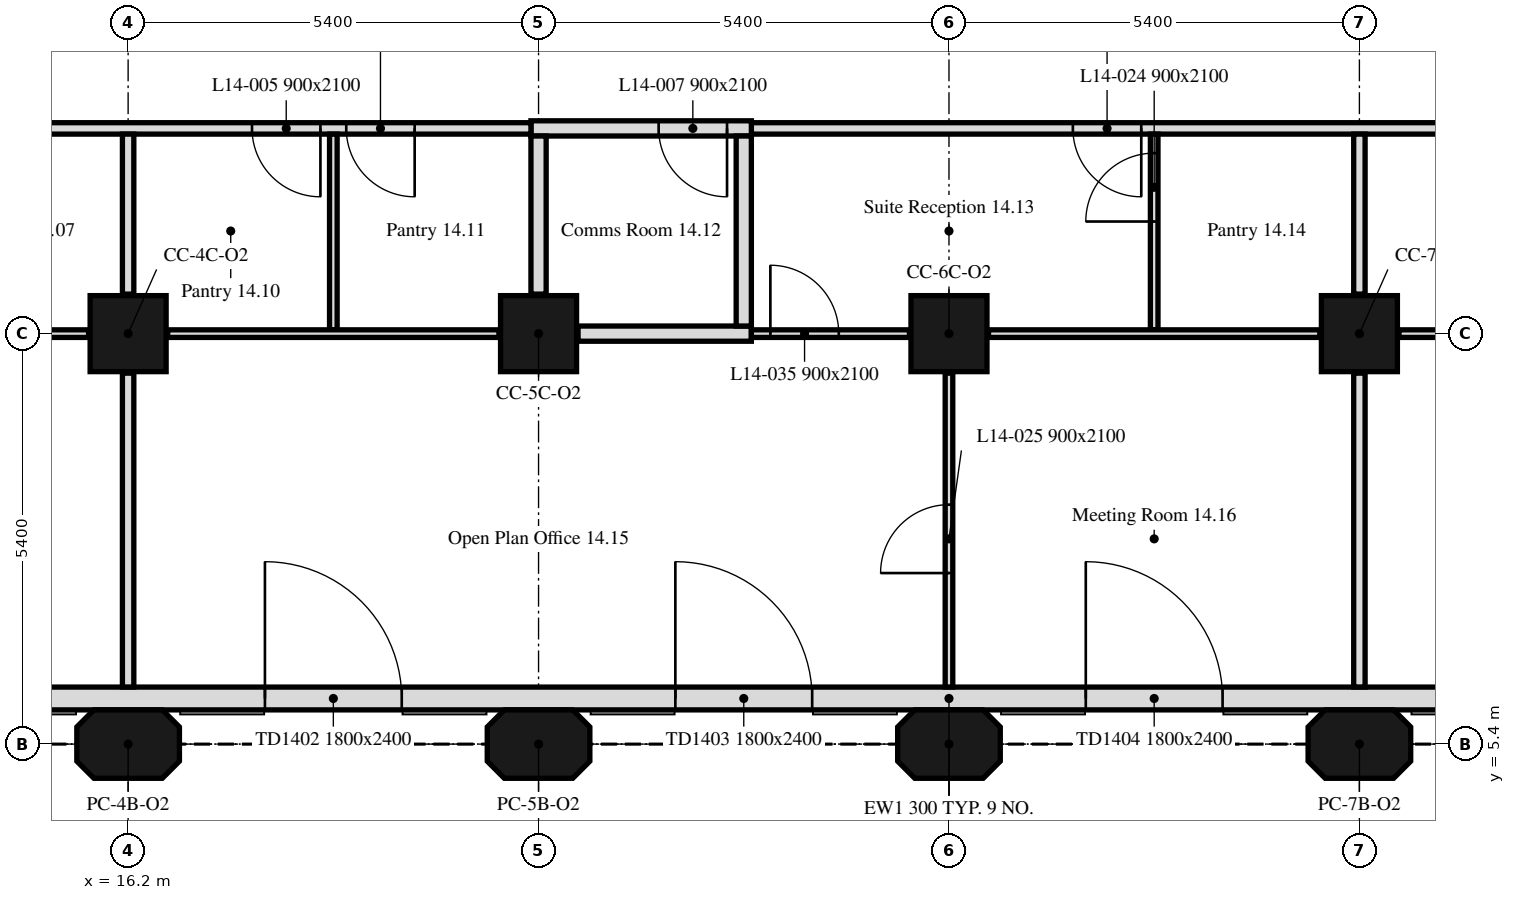
"""IFC4 building model, lengths in metres.
Left out: names, types, materials, properties, quantities, classifications, styles, units other than length and angle.
Written with IfcOpenShell. Run it as: python <this file> out.ifc"""

import sys

from ifc_helpers import new_model, si_unit, direction, frame, frame_2d, origin, origin_2d, place, context, subcontext, project, spatial, polyline, rectangle, outline, extrude, element, fill, save


model = new_model("IFC4")
c1 = context("Model", 3, precision=1e-05, world=origin(), true_north=direction((0.0, 1.0)))
c2 = subcontext(c1, "Body", "Model", "MODEL_VIEW")
j1 = project(units=[si_unit("LENGTHUNIT", "METRE"), si_unit("PLANEANGLEUNIT", "RADIAN")], contexts=[c1])
p1 = place(None, origin())
s1 = spatial("IfcSite", under=j1, at=p1, CompositionType="ELEMENT")
p2 = place(p1, origin())
s2 = spatial("IfcBuilding", under=s1, at=p2, CompositionType="ELEMENT")
p3 = place(p2, frame((0.0, 0.0, 65.0)))
s3 = spatial("IfcBuildingStorey", under=s2, at=p3, CompositionType="ELEMENT", Elevation=65.0)
for number, where, z_axis, x_axis in (
    (1, (16.2, 5.4, 0.0), (0.0, 0.0, 1.0), (1.0, 0.0, 0.0)),
    (2, (21.6, 5.4, 0.0), (0.0, 0.0, 1.0), (1.0, 0.0, 0.0)),
    (3, (27.0, 5.4, 0.0), (0.0, 0.0, 1.0), (1.0, 0.0, 0.0)),
    (4, (32.4, 5.4, 0.0), (0.0, 0.0, 1.0), (1.0, 0.0, 0.0)),
):
    element("IfcColumn", number, at=place(p3, frame(where, z_axis=z_axis, x_axis=x_axis)), inside=s3, PredefinedType="COLUMN", context=c2, shape_type="SweptSolid", body=[
        extrude(outline(polyline([(-0.45, -0.45), (0.45, -0.45), (0.675, -0.225), (0.675, 0.225), (0.45, 0.45), (-0.45, 0.45), (-0.675, 0.225), (-0.675, -0.225), (-0.45, -0.45)])), origin(), (0.0, 0.0, 1.0), 3.5),
    ])
for number, where, z_axis, x_axis in (
    (5, (16.2, 10.8, 0.0), (0.0, 0.0, 1.0), (1.0, 0.0, 0.0)),
    (6, (21.6, 10.8, 0.0), (0.0, 0.0, 1.0), (1.0, 0.0, 0.0)),
    (7, (27.0, 10.8, 0.0), (0.0, 0.0, 1.0), (1.0, 0.0, 0.0)),
    (8, (32.4, 10.8, 0.0), (0.0, 0.0, 1.0), (1.0, 0.0, 0.0)),
):
    element("IfcColumn", number, at=place(p3, frame(where, z_axis=z_axis, x_axis=x_axis)), inside=s3, PredefinedType="COLUMN", context=c2, shape_type="SweptSolid", body=[
        extrude(rectangle(XDim=1.0, YDim=1.0, at=origin_2d()), origin(), (0.0, 0.0, 1.0), 3.5),
    ])
p4 = place(p3, frame((10.986, 6.0, 0.0), z_axis=(0.0, 0.0, 1.0), x_axis=(1.0, 0.0, 0.0)))
e9 = element("IfcWall", 9, at=p4, inside=s3, PredefinedType="SOLIDWALL", context=c2, shape_type="SweptSolid", body=[
    extrude(rectangle(XDim=32.027, YDim=0.3, at=frame_2d((16.014, 0.0))), origin(), (0.0, 0.0, 1.0), 3.5),
])
p5 = place(p4, frame((1.614, 0.0, 0.0)))
e10 = element("IfcOpeningElement", 10, at=p5, cuts=e9, PredefinedType="OPENING", context=c2, shape_type="SweptSolid", body=[
    extrude(rectangle(XDim=1.8, YDim=2.4, at=frame_2d((0.9, 1.2))), frame((0.0, 0.16, 0.0), z_axis=(0.0, -1.0, 0.0), x_axis=(1.0, 0.0, 0.0)), (0.0, 0.0, 1.0), 0.32),
])
p6 = place(p4, frame((7.014, 0.0, 0.0)))
e11 = element("IfcOpeningElement", 11, at=p6, cuts=e9, PredefinedType="OPENING", context=c2, shape_type="SweptSolid", body=[
    extrude(rectangle(XDim=1.8, YDim=2.4, at=frame_2d((0.9, 1.2))), frame((0.0, 0.16, 0.0), z_axis=(0.0, -1.0, 0.0), x_axis=(1.0, 0.0, 0.0)), (0.0, 0.0, 1.0), 0.32),
])
p7 = place(p4, frame((12.414, 0.0, 0.0)))
e12 = element("IfcOpeningElement", 12, at=p7, cuts=e9, PredefinedType="OPENING", context=c2, shape_type="SweptSolid", body=[
    extrude(rectangle(XDim=1.8, YDim=2.4, at=frame_2d((0.9, 1.2))), frame((0.0, 0.16, 0.0), z_axis=(0.0, -1.0, 0.0), x_axis=(1.0, 0.0, 0.0)), (0.0, 0.0, 1.0), 0.32),
])
p8 = place(p4, frame((17.814, 0.0, 0.0)))
e13 = element("IfcOpeningElement", 13, at=p8, cuts=e9, PredefinedType="OPENING", context=c2, shape_type="SweptSolid", body=[
    extrude(rectangle(XDim=1.8, YDim=2.4, at=frame_2d((0.9, 1.2))), frame((0.0, 0.16, 0.0), z_axis=(0.0, -1.0, 0.0), x_axis=(1.0, 0.0, 0.0)), (0.0, 0.0, 1.0), 0.32),
])
p9 = place(p4, frame((23.214, 0.0, 0.0)))
e14 = element("IfcOpeningElement", 14, at=p9, cuts=e9, PredefinedType="OPENING", context=c2, shape_type="SweptSolid", body=[
    extrude(rectangle(XDim=1.8, YDim=2.4, at=frame_2d((0.9, 1.2))), frame((0.0, 0.16, 0.0), z_axis=(0.0, -1.0, 0.0), x_axis=(1.0, 0.0, 0.0)), (0.0, 0.0, 1.0), 0.32),
])
p10 = place(p4, frame((28.614, 0.0, 0.0)))
e15 = element("IfcOpeningElement", 15, at=p10, cuts=e9, PredefinedType="OPENING", context=c2, shape_type="SweptSolid", body=[
    extrude(rectangle(XDim=1.8, YDim=2.4, at=frame_2d((0.9, 1.2))), frame((0.0, 0.16, 0.0), z_axis=(0.0, -1.0, 0.0), x_axis=(1.0, 0.0, 0.0)), (0.0, 0.0, 1.0), 0.32),
])
p11 = place(p3, frame((37.7, 13.5, 0.0), z_axis=(0.0, 0.0, 1.0), x_axis=(-1.0, 0.0, 0.0)))
e16 = element("IfcWall", 16, at=p11, inside=s3, PredefinedType="PARTITIONING", context=c2, shape_type="SweptSolid", body=[
    extrude(rectangle(XDim=13.3, YDim=0.15, at=frame_2d((6.65, 0.0))), origin(), (0.0, 0.0, 1.0), 3.5),
])
p12 = place(p11, frame((2.15, 0.0, 0.0)))
e17 = element("IfcOpeningElement", 17, at=p12, cuts=e16, PredefinedType="OPENING", context=c2, shape_type="SweptSolid", body=[
    extrude(rectangle(XDim=0.9, YDim=2.1, at=frame_2d((0.45, 1.05))), frame((0.0, 0.075, 0.0), z_axis=(0.0, -1.0, 0.0), x_axis=(1.0, 0.0, 0.0)), (0.0, 0.0, 1.0), 0.15),
])
p13 = place(p11, frame((8.17, 0.0, 0.0)))
e18 = element("IfcOpeningElement", 18, at=p13, cuts=e16, PredefinedType="OPENING", context=c2, shape_type="SweptSolid", body=[
    extrude(rectangle(XDim=0.9, YDim=2.1, at=frame_2d((0.45, 1.05))), frame((0.0, 0.075, 0.0), z_axis=(0.0, -1.0, 0.0), x_axis=(1.0, 0.0, 0.0)), (0.0, 0.0, 1.0), 0.15),
])
p14 = place(p3, frame((24.4, 13.5, 0.0), z_axis=(0.0, 0.0, 1.0), x_axis=(-1.0, 0.0, 0.0)))
e19 = element("IfcWall", 19, at=p14, inside=s3, PredefinedType="PARTITIONING", context=c2, shape_type="SweptSolid", body=[
    extrude(rectangle(XDim=2.9, YDim=0.2, at=frame_2d((1.45, 0.0))), origin(), (0.0, 0.0, 1.0), 3.5),
])
p15 = place(p14, frame((0.32, 0.0, 0.0)))
e20 = element("IfcOpeningElement", 20, at=p15, cuts=e19, PredefinedType="OPENING", context=c2, shape_type="SweptSolid", body=[
    extrude(rectangle(XDim=0.9, YDim=2.1, at=frame_2d((0.45, 1.05))), frame((0.0, 0.1, 0.0), z_axis=(0.0, -1.0, 0.0), x_axis=(1.0, 0.0, 0.0)), (0.0, 0.0, 1.0), 0.2),
])
p16 = place(p3, frame((21.5, 13.5, 0.0), z_axis=(0.0, 0.0, 1.0), x_axis=(-1.0, 0.0, 0.0)))
e21 = element("IfcWall", 21, at=p16, inside=s3, PredefinedType="PARTITIONING", context=c2, shape_type="SweptSolid", body=[
    extrude(rectangle(XDim=15.349, YDim=0.15, at=frame_2d((7.675, 0.0))), origin(), (0.0, 0.0, 1.0), 3.5),
])
p17 = place(p16, frame((13.57, 0.0, 0.0)))
e22 = element("IfcOpeningElement", 22, at=p17, cuts=e21, PredefinedType="OPENING", context=c2, shape_type="SweptSolid", body=[
    extrude(rectangle(XDim=0.9, YDim=2.1, at=frame_2d((0.45, 1.05))), frame((0.0, 0.075, 0.0), z_axis=(0.0, -1.0, 0.0), x_axis=(1.0, 0.0, 0.0)), (0.0, 0.0, 1.0), 0.15),
])
p18 = place(p16, frame((2.77, 0.0, 0.0)))
e23 = element("IfcOpeningElement", 23, at=p18, cuts=e21, PredefinedType="OPENING", context=c2, shape_type="SweptSolid", body=[
    extrude(rectangle(XDim=0.9, YDim=2.1, at=frame_2d((0.45, 1.05))), frame((0.0, 0.075, 0.0), z_axis=(0.0, -1.0, 0.0), x_axis=(1.0, 0.0, 0.0)), (0.0, 0.0, 1.0), 0.15),
])
p19 = place(p16, frame((1.53, 0.0, 0.0)))
e24 = element("IfcOpeningElement", 24, at=p19, cuts=e21, PredefinedType="OPENING", context=c2, shape_type="SweptSolid", body=[
    extrude(rectangle(XDim=0.9, YDim=2.1, at=frame_2d((0.45, 1.05))), frame((0.0, 0.075, 0.0), z_axis=(0.0, -1.0, 0.0), x_axis=(1.0, 0.0, 0.0)), (0.0, 0.0, 1.0), 0.15),
])
p20 = place(p16, frame((8.17, 0.0, 0.0)))
e25 = element("IfcOpeningElement", 25, at=p20, cuts=e21, PredefinedType="OPENING", context=c2, shape_type="SweptSolid", body=[
    extrude(rectangle(XDim=0.9, YDim=2.1, at=frame_2d((0.45, 1.05))), frame((0.0, 0.075, 0.0), z_axis=(0.0, -1.0, 0.0), x_axis=(1.0, 0.0, 0.0)), (0.0, 0.0, 1.0), 0.15),
])
p21 = place(p3, frame((11.32, 10.8, 0.0), z_axis=(0.0, 0.0, 1.0), x_axis=(1.0, 0.0, 0.0)))
e26 = element("IfcWall", 26, at=p21, inside=s3, PredefinedType="PARTITIONING", context=c2, shape_type="SweptSolid", body=[
    extrude(rectangle(XDim=4.36, YDim=0.1, at=frame_2d((2.18, 0.0))), origin(), (0.0, 0.0, 1.0), 3.5),
])
p22 = place(p3, frame((16.2, 11.32, 0.0), z_axis=(0.0, 0.0, 1.0), x_axis=(0.0, 1.0, 0.0)))
e27 = element("IfcWall", 27, at=p22, inside=s3, PredefinedType="PARTITIONING", context=c2, shape_type="SweptSolid", body=[
    extrude(rectangle(XDim=2.105, YDim=0.15, at=frame_2d((1.052, 0.0))), origin(), (0.0, 0.0, 1.0), 3.5),
])
p23 = place(p3, frame((16.2, 6.151, 0.0), z_axis=(0.0, 0.0, 1.0), x_axis=(0.0, 1.0, 0.0)))
e28 = element("IfcWall", 28, at=p23, inside=s3, PredefinedType="PARTITIONING", context=c2, shape_type="SweptSolid", body=[
    extrude(rectangle(XDim=4.129, YDim=0.15, at=frame_2d((2.064, 0.0))), origin(), (0.0, 0.0, 1.0), 3.5),
])
p24 = place(p3, frame((18.9, 10.85, 0.0), z_axis=(0.0, 0.0, 1.0), x_axis=(0.0, 1.0, 0.0)))
e29 = element("IfcWall", 29, at=p24, inside=s3, PredefinedType="PARTITIONING", context=c2, shape_type="SweptSolid", body=[
    extrude(rectangle(XDim=2.575, YDim=0.1, at=frame_2d((1.288, 0.0))), origin(), (0.0, 0.0, 1.0), 3.5),
])
p25 = place(p3, frame((16.72, 10.8, 0.0), z_axis=(0.0, 0.0, 1.0), x_axis=(1.0, 0.0, 0.0)))
e30 = element("IfcWall", 30, at=p25, inside=s3, PredefinedType="PARTITIONING", context=c2, shape_type="SweptSolid", body=[
    extrude(rectangle(XDim=4.36, YDim=0.1, at=frame_2d((2.18, 0.0))), origin(), (0.0, 0.0, 1.0), 3.5),
])
p26 = place(p3, frame((21.6, 11.32, 0.0), z_axis=(0.0, 0.0, 1.0), x_axis=(0.0, 1.0, 0.0)))
e31 = element("IfcWall", 31, at=p26, inside=s3, PredefinedType="PARTITIONING", context=c2, shape_type="SweptSolid", body=[
    extrude(rectangle(XDim=2.08, YDim=0.2, at=frame_2d((1.04, 0.0))), origin(), (0.0, 0.0, 1.0), 3.5),
])
p27 = place(p3, frame((22.12, 10.8, 0.0), z_axis=(0.0, 0.0, 1.0), x_axis=(1.0, 0.0, 0.0)))
e32 = element("IfcWall", 32, at=p27, inside=s3, PredefinedType="PARTITIONING", context=c2, shape_type="SweptSolid", body=[
    extrude(rectangle(XDim=2.28, YDim=0.2, at=frame_2d((1.14, 0.0))), origin(), (0.0, 0.0, 1.0), 3.5),
])
p28 = place(p3, frame((24.3, 10.9, 0.0), z_axis=(0.0, 0.0, 1.0), x_axis=(0.0, 1.0, 0.0)))
e33 = element("IfcWall", 33, at=p28, inside=s3, PredefinedType="PARTITIONING", context=c2, shape_type="SweptSolid", body=[
    extrude(rectangle(XDim=2.5, YDim=0.2, at=frame_2d((1.25, 0.0))), origin(), (0.0, 0.0, 1.0), 3.5),
])
p29 = place(p3, frame((24.4, 10.8, 0.0), z_axis=(0.0, 0.0, 1.0), x_axis=(1.0, 0.0, 0.0)))
e34 = element("IfcWall", 34, at=p29, inside=s3, PredefinedType="PARTITIONING", context=c2, shape_type="SweptSolid", body=[
    extrude(rectangle(XDim=2.08, YDim=0.1, at=frame_2d((1.04, 0.0))), origin(), (0.0, 0.0, 1.0), 3.5),
])
p30 = place(p29, frame((0.25, 0.0, 0.0)))
e35 = element("IfcOpeningElement", 35, at=p30, cuts=e34, PredefinedType="OPENING", context=c2, shape_type="SweptSolid", body=[
    extrude(rectangle(XDim=0.9, YDim=2.1, at=frame_2d((0.45, 1.05))), frame((0.0, 0.05, 0.0), z_axis=(0.0, -1.0, 0.0), x_axis=(1.0, 0.0, 0.0)), (0.0, 0.0, 1.0), 0.1),
])
p31 = place(p3, frame((29.7, 10.85, 0.0), z_axis=(0.0, 0.0, 1.0), x_axis=(0.0, 1.0, 0.0)))
e36 = element("IfcWall", 36, at=p31, inside=s3, PredefinedType="PARTITIONING", context=c2, shape_type="SweptSolid", body=[
    extrude(rectangle(XDim=2.575, YDim=0.1, at=frame_2d((1.288, 0.0))), origin(), (0.0, 0.0, 1.0), 3.5),
])
p32 = place(p31, frame((1.425, 0.0, 0.0)))
e37 = element("IfcOpeningElement", 37, at=p32, cuts=e36, PredefinedType="OPENING", context=c2, shape_type="SweptSolid", body=[
    extrude(rectangle(XDim=0.9, YDim=2.1, at=frame_2d((0.45, 1.05))), frame((0.0, 0.05, 0.0), z_axis=(0.0, -1.0, 0.0), x_axis=(1.0, 0.0, 0.0)), (0.0, 0.0, 1.0), 0.1),
])
p33 = place(p3, frame((27.52, 10.8, 0.0), z_axis=(0.0, 0.0, 1.0), x_axis=(1.0, 0.0, 0.0)))
e38 = element("IfcWall", 38, at=p33, inside=s3, PredefinedType="PARTITIONING", context=c2, shape_type="SweptSolid", body=[
    extrude(rectangle(XDim=4.36, YDim=0.1, at=frame_2d((2.18, 0.0))), origin(), (0.0, 0.0, 1.0), 3.5),
])
p34 = place(p3, frame((32.4, 11.32, 0.0), z_axis=(0.0, 0.0, 1.0), x_axis=(0.0, 1.0, 0.0)))
e39 = element("IfcWall", 39, at=p34, inside=s3, PredefinedType="PARTITIONING", context=c2, shape_type="SweptSolid", body=[
    extrude(rectangle(XDim=2.105, YDim=0.15, at=frame_2d((1.052, 0.0))), origin(), (0.0, 0.0, 1.0), 3.5),
])
p35 = place(p3, frame((27.0, 6.151, 0.0), z_axis=(0.0, 0.0, 1.0), x_axis=(0.0, 1.0, 0.0)))
e40 = element("IfcWall", 40, at=p35, inside=s3, PredefinedType="PARTITIONING", context=c2, shape_type="SweptSolid", body=[
    extrude(rectangle(XDim=4.129, YDim=0.1, at=frame_2d((2.064, 0.0))), origin(), (0.0, 0.0, 1.0), 3.5),
])
p36 = place(p35, frame((1.499, 0.0, 0.0)))
e41 = element("IfcOpeningElement", 41, at=p36, cuts=e40, PredefinedType="OPENING", context=c2, shape_type="SweptSolid", body=[
    extrude(rectangle(XDim=0.9, YDim=2.1, at=frame_2d((0.45, 1.05))), frame((0.0, 0.05, 0.0), z_axis=(0.0, -1.0, 0.0), x_axis=(1.0, 0.0, 0.0)), (0.0, 0.0, 1.0), 0.1),
])
p37 = place(p3, frame((32.4, 6.151, 0.0), z_axis=(0.0, 0.0, 1.0), x_axis=(0.0, 1.0, 0.0)))
e42 = element("IfcWall", 42, at=p37, inside=s3, PredefinedType="PARTITIONING", context=c2, shape_type="SweptSolid", body=[
    extrude(rectangle(XDim=4.129, YDim=0.15, at=frame_2d((2.064, 0.0))), origin(), (0.0, 0.0, 1.0), 3.5),
])
p38 = place(p3, frame((32.92, 10.8, 0.0), z_axis=(0.0, 0.0, 1.0), x_axis=(1.0, 0.0, 0.0)))
e43 = element("IfcWall", 43, at=p38, inside=s3, PredefinedType="PARTITIONING", context=c2, shape_type="SweptSolid", body=[
    extrude(rectangle(XDim=4.36, YDim=0.1, at=frame_2d((2.18, 0.0))), origin(), (0.0, 0.0, 1.0), 3.5),
])
p39 = place(p38, frame((1.73, 0.0, 0.0)))
e44 = element("IfcOpeningElement", 44, at=p39, cuts=e43, PredefinedType="OPENING", context=c2, shape_type="SweptSolid", body=[
    extrude(rectangle(XDim=0.9, YDim=2.1, at=frame_2d((0.45, 1.05))), frame((0.0, 0.05, 0.0), z_axis=(0.0, -1.0, 0.0), x_axis=(1.0, 0.0, 0.0)), (0.0, 0.0, 1.0), 0.1),
])
p40 = place(p6, origin())
e45 = element("IfcDoor", 45, at=p40, inside=s3, OperationType="DOUBLE_DOOR_DOUBLE_SWING", PredefinedType="DOOR", context=c2, shape_type="SweptSolid", body=[
    extrude(rectangle(XDim=1.8, YDim=2.4, at=frame_2d((0.9, 1.2))), frame((0.0, 0.025, 0.0), z_axis=(0.0, -1.0, 0.0), x_axis=(1.0, 0.0, 0.0)), (0.0, 0.0, 1.0), 0.05),
])
fill(e11, e45)
p41 = place(p7, origin())
e46 = element("IfcDoor", 46, at=p41, inside=s3, OperationType="DOUBLE_DOOR_DOUBLE_SWING", PredefinedType="DOOR", context=c2, shape_type="SweptSolid", body=[
    extrude(rectangle(XDim=1.8, YDim=2.4, at=frame_2d((0.9, 1.2))), frame((0.0, 0.025, 0.0), z_axis=(0.0, -1.0, 0.0), x_axis=(1.0, 0.0, 0.0)), (0.0, 0.0, 1.0), 0.05),
])
fill(e12, e46)
p42 = place(p8, origin())
e47 = element("IfcDoor", 47, at=p42, inside=s3, OperationType="DOUBLE_DOOR_DOUBLE_SWING", PredefinedType="DOOR", context=c2, shape_type="SweptSolid", body=[
    extrude(rectangle(XDim=1.8, YDim=2.4, at=frame_2d((0.9, 1.2))), frame((0.0, 0.025, 0.0), z_axis=(0.0, -1.0, 0.0), x_axis=(1.0, 0.0, 0.0)), (0.0, 0.0, 1.0), 0.05),
])
fill(e13, e47)
p43 = place(p18, origin())
e48 = element("IfcDoor", 48, at=p43, inside=s3, OperationType="SINGLE_SWING_LEFT", PredefinedType="DOOR", context=c2, shape_type="SweptSolid", body=[
    extrude(rectangle(XDim=0.9, YDim=2.1, at=frame_2d((0.45, 1.05))), frame((0.0, 0.025, 0.0), z_axis=(0.0, -1.0, 0.0), x_axis=(1.0, 0.0, 0.0)), (0.0, 0.0, 1.0), 0.05),
])
fill(e23, e48)
p44 = place(p19, origin())
e49 = element("IfcDoor", 49, at=p44, inside=s3, OperationType="SINGLE_SWING_LEFT", PredefinedType="DOOR", context=c2, shape_type="SweptSolid", body=[
    extrude(rectangle(XDim=0.9, YDim=2.1, at=frame_2d((0.45, 1.05))), frame((0.0, 0.025, 0.0), z_axis=(0.0, -1.0, 0.0), x_axis=(1.0, 0.0, 0.0)), (0.0, 0.0, 1.0), 0.05),
])
fill(e24, e49)
p45 = place(p15, origin())
e50 = element("IfcDoor", 50, at=p45, inside=s3, OperationType="SINGLE_SWING_LEFT", PredefinedType="DOOR", context=c2, shape_type="SweptSolid", body=[
    extrude(rectangle(XDim=0.9, YDim=2.1, at=frame_2d((0.45, 1.05))), frame((0.0, 0.025, 0.0), z_axis=(0.0, -1.0, 0.0), x_axis=(1.0, 0.0, 0.0)), (0.0, 0.0, 1.0), 0.05),
])
fill(e20, e50)
p46 = place(p32, origin())
e51 = element("IfcDoor", 51, at=p46, inside=s3, OperationType="SINGLE_SWING_LEFT", PredefinedType="DOOR", context=c2, shape_type="SweptSolid", body=[
    extrude(rectangle(XDim=0.9, YDim=2.1, at=frame_2d((0.45, 1.05))), frame((0.0, 0.025, 0.0), z_axis=(0.0, -1.0, 0.0), x_axis=(1.0, 0.0, 0.0)), (0.0, 0.0, 1.0), 0.05),
])
fill(e37, e51)
p47 = place(p36, origin())
e52 = element("IfcDoor", 52, at=p47, inside=s3, OperationType="SINGLE_SWING_LEFT", PredefinedType="DOOR", context=c2, shape_type="SweptSolid", body=[
    extrude(rectangle(XDim=0.9, YDim=2.1, at=frame_2d((0.45, 1.05))), frame((0.0, 0.025, 0.0), z_axis=(0.0, -1.0, 0.0), x_axis=(1.0, 0.0, 0.0)), (0.0, 0.0, 1.0), 0.05),
])
fill(e41, e52)
p48 = place(p13, origin())
e53 = element("IfcDoor", 53, at=p48, inside=s3, OperationType="SINGLE_SWING_LEFT", PredefinedType="DOOR", context=c2, shape_type="SweptSolid", body=[
    extrude(rectangle(XDim=0.9, YDim=2.1, at=frame_2d((0.45, 1.05))), frame((0.0, 0.025, 0.0), z_axis=(0.0, -1.0, 0.0), x_axis=(1.0, 0.0, 0.0)), (0.0, 0.0, 1.0), 0.05),
])
fill(e18, e53)
p49 = place(p30, origin())
e54 = element("IfcDoor", 54, at=p49, inside=s3, OperationType="SINGLE_SWING_LEFT", PredefinedType="DOOR", context=c2, shape_type="SweptSolid", body=[
    extrude(rectangle(XDim=0.9, YDim=2.1, at=frame_2d((0.45, 1.05))), frame((0.0, 0.025, 0.0), z_axis=(0.0, -1.0, 0.0), x_axis=(1.0, 0.0, 0.0)), (0.0, 0.0, 1.0), 0.05),
])
fill(e35, e54)
save(model, sys.argv[1])
